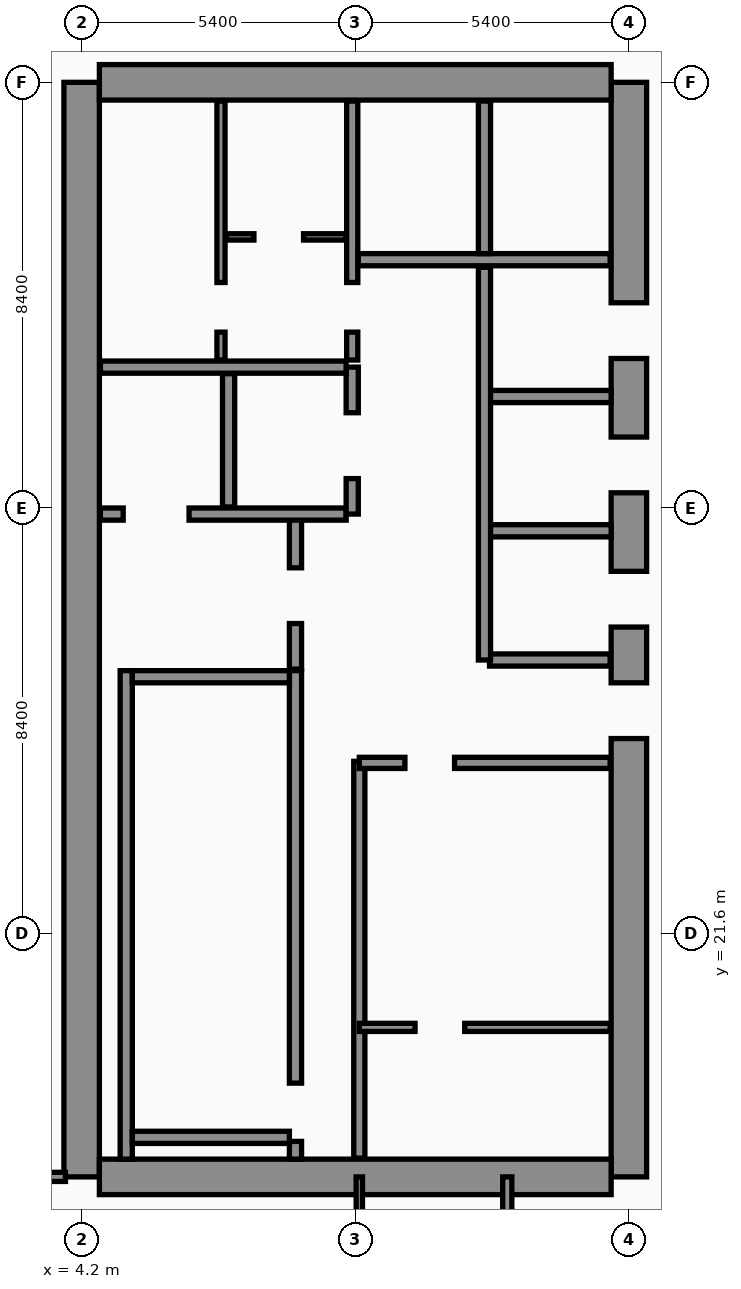
"""IFC4 building model, lengths in metres.
Left out: names, types, materials, properties, quantities, classifications, styles, units other than length and angle.
Written with IfcOpenShell. Run it as: python <this file> out.ifc"""

import sys

from ifc_helpers import new_model, si_unit, direction, frame, frame_2d, origin, place, context, subcontext, project, spatial, rectangle, extrude, element, fill, save


model = new_model("IFC4")
c1 = context("Model", 3, precision=1e-05, world=origin(), true_north=direction((0.0, 1.0)))
c2 = subcontext(c1, "Body", "Model", "MODEL_VIEW")
j1 = project(units=[si_unit("LENGTHUNIT", "METRE"), si_unit("PLANEANGLEUNIT", "RADIAN")], contexts=[c1])
p1 = place(None, origin())
s1 = spatial("IfcSite", under=j1, at=p1, CompositionType="ELEMENT")
p2 = place(p1, origin())
s2 = spatial("IfcBuilding", under=s1, at=p2, CompositionType="ELEMENT")
p3 = place(p2, frame((0.0, 0.0, 211.0)))
s3 = spatial("IfcBuildingStorey", under=s2, at=p3, CompositionType="ELEMENT", Elevation=211.0)
p4 = place(p3, frame((4.2, 16.8, 0.0), z_axis=(0.0, 0.0, 1.0), x_axis=(0.0, 1.0, 0.0)))
e1 = element("IfcWall", 1, at=p4, inside=s3, PredefinedType="SHEAR", context=c2, shape_type="SweptSolid", body=[
    extrude(rectangle(XDim=21.6, YDim=0.7, at=frame_2d((10.8, 0.0))), origin(), (0.0, 0.0, 1.0), 3.56),
])
p5 = place(p3, frame((15.0, 16.8, 0.0), z_axis=(0.0, 0.0, 1.0), x_axis=(0.0, 1.0, 0.0)))
e2 = element("IfcWall", 2, at=p5, inside=s3, PredefinedType="SHEAR", context=c2, shape_type="SweptSolid", body=[
    extrude(rectangle(XDim=21.6, YDim=0.7, at=frame_2d((10.8, 0.0))), origin(), (0.0, 0.0, 1.0), 3.56),
])
p6 = place(p5, frame((8.65, 0.0, 0.0)))
e3 = element("IfcOpeningElement", 3, at=p6, cuts=e2, PredefinedType="OPENING", context=c2, shape_type="SweptSolid", body=[
    extrude(rectangle(XDim=1.1, YDim=2.2, at=frame_2d((0.55, 1.1))), frame((0.0, 0.36, 0.0), z_axis=(0.0, -1.0, 0.0), x_axis=(1.0, 0.0, 0.0)), (0.0, 0.0, 1.0), 0.72),
])
p7 = place(p5, frame((10.85, 0.0, 0.0)))
e4 = element("IfcOpeningElement", 4, at=p7, cuts=e2, PredefinedType="OPENING", context=c2, shape_type="SweptSolid", body=[
    extrude(rectangle(XDim=1.1, YDim=2.2, at=frame_2d((0.55, 1.1))), frame((0.0, 0.36, 0.0), z_axis=(0.0, -1.0, 0.0), x_axis=(1.0, 0.0, 0.0)), (0.0, 0.0, 1.0), 0.72),
])
p8 = place(p5, frame((13.5, 0.0, 0.0)))
e5 = element("IfcOpeningElement", 5, at=p8, cuts=e2, PredefinedType="OPENING", context=c2, shape_type="SweptSolid", body=[
    extrude(rectangle(XDim=1.1, YDim=2.2, at=frame_2d((0.55, 1.1))), frame((0.0, 0.36, 0.0), z_axis=(0.0, -1.0, 0.0), x_axis=(1.0, 0.0, 0.0)), (0.0, 0.0, 1.0), 0.72),
])
p9 = place(p5, frame((16.15, 0.0, 0.0)))
e6 = element("IfcOpeningElement", 6, at=p9, cuts=e2, PredefinedType="OPENING", context=c2, shape_type="SweptSolid", body=[
    extrude(rectangle(XDim=1.1, YDim=2.2, at=frame_2d((0.55, 1.1))), frame((0.0, 0.36, 0.0), z_axis=(0.0, -1.0, 0.0), x_axis=(1.0, 0.0, 0.0)), (0.0, 0.0, 1.0), 0.72),
])
for number, where, z_axis, x_axis in (
    (7, (4.55, 38.4, 0.0), (0.0, 0.0, 1.0), (1.0, 0.0, 0.0)),
    (8, (4.55, 16.8, 0.0), (0.0, 0.0, 1.0), (1.0, 0.0, 0.0)),
):
    element("IfcWall", number, at=place(p3, frame(where, z_axis=z_axis, x_axis=x_axis)), inside=s3, PredefinedType="SHEAR", context=c2, shape_type="SweptSolid", body=[
        extrude(rectangle(XDim=10.1, YDim=0.7, at=frame_2d((5.05, 0.0))), origin(), (0.0, 0.0, 1.0), 3.56),
    ])
p10 = place(p3, frame((5.08, 17.15, 0.0), z_axis=(0.0, 0.0, 1.0), x_axis=(0.0, 1.0, 0.0)))
e9 = element("IfcWall", 9, at=p10, inside=s3, PredefinedType="SOLIDWALL", context=c2, shape_type="SweptSolid", body=[
    extrude(rectangle(XDim=9.64, YDim=0.24, at=frame_2d((4.82, 0.0))), origin(), (0.0, 0.0, 1.0), 3.56),
])
p11 = place(p3, frame((8.42, 17.15, 0.0), z_axis=(0.0, 0.0, 1.0), x_axis=(0.0, 1.0, 0.0)))
e10 = element("IfcWall", 10, at=p11, inside=s3, PredefinedType="SOLIDWALL", context=c2, shape_type="SweptSolid", body=[
    extrude(rectangle(XDim=9.64, YDim=0.24, at=frame_2d((4.82, 0.0))), origin(), (0.0, 0.0, 1.0), 3.56),
])
p12 = place(p11, frame((0.35, 0.0, 0.0)))
e11 = element("IfcOpeningElement", 11, at=p12, cuts=e10, PredefinedType="OPENING", context=c2, shape_type="SweptSolid", body=[
    extrude(rectangle(XDim=1.15, YDim=2.2, at=frame_2d((0.575, 1.1))), frame((0.0, 0.13, 0.0), z_axis=(0.0, -1.0, 0.0), x_axis=(1.0, 0.0, 0.0)), (0.0, 0.0, 1.0), 0.26),
])
for number, where, z_axis, x_axis in (
    (12, (5.2, 17.58, 0.0), (0.0, 0.0, 1.0), (1.0, 0.0, 0.0)),
    (13, (5.2, 26.67, 0.0), (0.0, 0.0, 1.0), (1.0, 0.0, 0.0)),
):
    element("IfcWall", number, at=place(p3, frame(where, z_axis=z_axis, x_axis=x_axis)), inside=s3, PredefinedType="SOLIDWALL", context=c2, shape_type="SweptSolid", body=[
        extrude(rectangle(XDim=3.1, YDim=0.24, at=frame_2d((1.55, 0.0))), origin(), (0.0, 0.0, 1.0), 3.56),
    ])
for number, where, z_axis, x_axis in (
    (14, (12.18, 29.55, 0.0), (0.0, 0.0, 1.0), (1.0, 0.0, 0.0)),
    (15, (12.18, 32.2, 0.0), (0.0, 0.0, 1.0), (1.0, 0.0, 0.0)),
):
    element("IfcWall", number, at=place(p3, frame(where, z_axis=z_axis, x_axis=x_axis)), inside=s3, PredefinedType="SOLIDWALL", context=c2, shape_type="SweptSolid", body=[
        extrude(rectangle(XDim=2.47, YDim=0.24, at=frame_2d((1.235, 0.0))), origin(), (0.0, 0.0, 1.0), 3.56),
    ])
p13 = place(p3, frame((8.42, 26.82, 0.0), z_axis=(0.0, 0.0, 1.0), x_axis=(0.0, 1.0, 0.0)))
e16 = element("IfcWall", 16, at=p13, inside=s3, PredefinedType="SOLIDWALL", context=c2, shape_type="SweptSolid", body=[
    extrude(rectangle(XDim=3.0, YDim=0.24, at=frame_2d((1.5, 0.0))), origin(), (0.0, 0.0, 1.0), 3.56),
])
p14 = place(p13, frame((0.9, 0.0, 0.0)))
e17 = element("IfcOpeningElement", 17, at=p14, cuts=e16, PredefinedType="OPENING", context=c2, shape_type="SweptSolid", body=[
    extrude(rectangle(XDim=1.1, YDim=2.2, at=frame_2d((0.55, 1.1))), frame((0.0, 0.13, 0.0), z_axis=(0.0, -1.0, 0.0), x_axis=(1.0, 0.0, 0.0)), (0.0, 0.0, 1.0), 0.26),
])
p15 = place(p3, frame((4.57, 29.88, 0.0), z_axis=(0.0, 0.0, 1.0), x_axis=(1.0, 0.0, 0.0)))
e18 = element("IfcWall", 18, at=p15, inside=s3, PredefinedType="SOLIDWALL", context=c2, shape_type="SweptSolid", body=[
    extrude(rectangle(XDim=4.85, YDim=0.24, at=frame_2d((2.425, 0.0))), origin(), (0.0, 0.0, 1.0), 3.56),
])
p16 = place(p15, frame((0.45, 0.0, 0.0)))
e19 = element("IfcOpeningElement", 19, at=p16, cuts=e18, PredefinedType="OPENING", context=c2, shape_type="SweptSolid", body=[
    extrude(rectangle(XDim=1.3, YDim=2.35, at=frame_2d((0.65, 1.175))), frame((0.0, 0.13, 0.0), z_axis=(0.0, -1.0, 0.0), x_axis=(1.0, 0.0, 0.0)), (0.0, 0.0, 1.0), 0.26),
])
p17 = place(p3, frame((7.1, 30.02, 0.0), z_axis=(0.0, 0.0, 1.0), x_axis=(0.0, 1.0, 0.0)))
e20 = element("IfcWall", 20, at=p17, inside=s3, PredefinedType="SOLIDWALL", context=c2, shape_type="SweptSolid", body=[
    extrude(rectangle(XDim=2.63, YDim=0.24, at=frame_2d((1.315, 0.0))), origin(), (0.0, 0.0, 1.0), 3.56),
])
p18 = place(p3, frame((9.54, 29.88, 0.0), z_axis=(0.0, 0.0, 1.0), x_axis=(0.0, 1.0, 0.0)))
e21 = element("IfcWall", 21, at=p18, inside=s3, PredefinedType="SOLIDWALL", context=c2, shape_type="SweptSolid", body=[
    extrude(rectangle(XDim=2.9, YDim=0.24, at=frame_2d((1.45, 0.0))), origin(), (0.0, 0.0, 1.0), 3.56),
])
p19 = place(p18, frame((0.7, 0.0, 0.0)))
e22 = element("IfcOpeningElement", 22, at=p19, cuts=e21, PredefinedType="OPENING", context=c2, shape_type="SweptSolid", body=[
    extrude(rectangle(XDim=1.3, YDim=2.35, at=frame_2d((0.65, 1.175))), frame((0.0, 0.13, 0.0), z_axis=(0.0, -1.0, 0.0), x_axis=(1.0, 0.0, 0.0)), (0.0, 0.0, 1.0), 0.26),
])
p20 = place(p3, frame((4.57, 32.78, 0.0), z_axis=(0.0, 0.0, 1.0), x_axis=(1.0, 0.0, 0.0)))
e23 = element("IfcWall", 23, at=p20, inside=s3, PredefinedType="SOLIDWALL", context=c2, shape_type="SweptSolid", body=[
    extrude(rectangle(XDim=4.85, YDim=0.24, at=frame_2d((2.425, 0.0))), origin(), (0.0, 0.0, 1.0), 3.19),
])
p21 = place(p3, frame((9.68, 17.17, 0.0), z_axis=(0.0, 0.0, 1.0), x_axis=(0.0, 1.0, 0.0)))
e24 = element("IfcWall", 24, at=p21, inside=s3, PredefinedType="SOLIDWALL", context=c2, shape_type="SweptSolid", body=[
    extrude(rectangle(XDim=7.83, YDim=0.22, at=frame_2d((3.915, 0.0))), origin(), (0.0, 0.0, 1.0), 3.56),
])
p22 = place(p3, frame((6.95, 32.92, 0.0), z_axis=(0.0, 0.0, 1.0), x_axis=(0.0, 1.0, 0.0)))
e25 = element("IfcWall", 25, at=p22, inside=s3, PredefinedType="PARTITIONING", context=c2, shape_type="SweptSolid", body=[
    extrude(rectangle(XDim=5.11, YDim=0.16, at=frame_2d((2.555, 0.0))), origin(), (0.0, 0.0, 1.0), 3.56),
])
p23 = place(p22, frame((0.55, 0.0, 0.0)))
e26 = element("IfcOpeningElement", 26, at=p23, cuts=e25, PredefinedType="OPENING", context=c2, shape_type="SweptSolid", body=[
    extrude(rectangle(XDim=0.98, YDim=2.15, at=frame_2d((0.49, 1.075))), frame((0.0, 0.09, 0.0), z_axis=(0.0, -1.0, 0.0), x_axis=(1.0, 0.0, 0.0)), (0.0, 0.0, 1.0), 0.18),
])
p24 = place(p3, frame((7.05, 35.35, 0.0), z_axis=(0.0, 0.0, 1.0), x_axis=(1.0, 0.0, 0.0)))
e27 = element("IfcWall", 27, at=p24, inside=s3, PredefinedType="PARTITIONING", context=c2, shape_type="SweptSolid", body=[
    extrude(rectangle(XDim=2.37, YDim=0.125, at=frame_2d((1.185, 0.0))), origin(), (0.0, 0.0, 1.0), 3.56),
])
p25 = place(p24, frame((0.55, 0.0, 0.0)))
e28 = element("IfcOpeningElement", 28, at=p25, cuts=e27, PredefinedType="OPENING", context=c2, shape_type="SweptSolid", body=[
    extrude(rectangle(XDim=0.98, YDim=2.15, at=frame_2d((0.49, 1.075))), frame((0.0, 0.073, 0.0), z_axis=(0.0, -1.0, 0.0), x_axis=(1.0, 0.0, 0.0)), (0.0, 0.0, 1.0), 0.145),
])
p26 = place(p3, frame((9.54, 32.92, 0.0), z_axis=(0.0, 0.0, 1.0), x_axis=(0.0, 1.0, 0.0)))
e29 = element("IfcWall", 29, at=p26, inside=s3, PredefinedType="SOLIDWALL", context=c2, shape_type="SweptSolid", body=[
    extrude(rectangle(XDim=5.11, YDim=0.22, at=frame_2d((2.555, 0.0))), origin(), (0.0, 0.0, 1.0), 3.56),
])
p27 = place(p26, frame((0.55, 0.0, 0.0)))
e30 = element("IfcOpeningElement", 30, at=p27, cuts=e29, PredefinedType="OPENING", context=c2, shape_type="SweptSolid", body=[
    extrude(rectangle(XDim=0.98, YDim=2.15, at=frame_2d((0.49, 1.075))), frame((0.0, 0.12, 0.0), z_axis=(0.0, -1.0, 0.0), x_axis=(1.0, 0.0, 0.0)), (0.0, 0.0, 1.0), 0.24),
])
p28 = place(p3, frame((9.68, 19.75, 0.0), z_axis=(0.0, 0.0, 1.0), x_axis=(1.0, 0.0, 0.0)))
e31 = element("IfcWall", 31, at=p28, inside=s3, PredefinedType="PARTITIONING", context=c2, shape_type="SweptSolid", body=[
    extrude(rectangle(XDim=4.95, YDim=0.16, at=frame_2d((2.475, 0.0))), origin(), (0.0, 0.0, 1.0), 3.56),
])
p29 = place(p28, frame((1.1, 0.0, 0.0)))
e32 = element("IfcOpeningElement", 32, at=p29, cuts=e31, PredefinedType="OPENING", context=c2, shape_type="SweptSolid", body=[
    extrude(rectangle(XDim=0.98, YDim=2.15, at=frame_2d((0.49, 1.075))), frame((0.0, 0.09, 0.0), z_axis=(0.0, -1.0, 0.0), x_axis=(1.0, 0.0, 0.0)), (0.0, 0.0, 1.0), 0.18),
])
p30 = place(p3, frame((9.68, 24.97, 0.0), z_axis=(0.0, 0.0, 1.0), x_axis=(1.0, 0.0, 0.0)))
e33 = element("IfcWall", 33, at=p30, inside=s3, PredefinedType="SOLIDWALL", context=c2, shape_type="SweptSolid", body=[
    extrude(rectangle(XDim=4.95, YDim=0.22, at=frame_2d((2.475, 0.0))), origin(), (0.0, 0.0, 1.0), 2.94),
])
p31 = place(p30, frame((0.9, 0.0, 0.0)))
e34 = element("IfcOpeningElement", 34, at=p31, cuts=e33, PredefinedType="OPENING", context=c2, shape_type="SweptSolid", body=[
    extrude(rectangle(XDim=0.98, YDim=2.15, at=frame_2d((0.49, 1.075))), frame((0.0, 0.12, 0.0), z_axis=(0.0, -1.0, 0.0), x_axis=(1.0, 0.0, 0.0)), (0.0, 0.0, 1.0), 0.24),
])
p32 = place(p3, frame((12.25, 27.0, 0.0), z_axis=(0.0, 0.0, 1.0), x_axis=(1.0, 0.0, 0.0)))
e35 = element("IfcWall", 35, at=p32, inside=s3, PredefinedType="SOLIDWALL", context=c2, shape_type="SweptSolid", body=[
    extrude(rectangle(XDim=2.38, YDim=0.24, at=frame_2d((1.19, 0.0))), origin(), (0.0, 0.0, 1.0), 3.56),
])
p33 = place(p3, frame((12.15, 27.0, 0.0), z_axis=(0.0, 0.0, 1.0), x_axis=(0.0, 1.0, 0.0)))
e36 = element("IfcWall", 36, at=p33, inside=s3, PredefinedType="SOLIDWALL", context=c2, shape_type="SweptSolid", body=[
    extrude(rectangle(XDim=7.75, YDim=0.24, at=frame_2d((3.875, 0.0))), origin(), (0.0, 0.0, 1.0), 3.56),
])
p34 = place(p3, frame((9.66, 34.9, 0.0), z_axis=(0.0, 0.0, 1.0), x_axis=(1.0, 0.0, 0.0)))
e37 = element("IfcWall", 37, at=p34, inside=s3, PredefinedType="SOLIDWALL", context=c2, shape_type="SweptSolid", body=[
    extrude(rectangle(XDim=4.97, YDim=0.24, at=frame_2d((2.485, 0.0))), origin(), (0.0, 0.0, 1.0), 3.56),
])
p35 = place(p3, frame((12.15, 35.02, 0.0), z_axis=(0.0, 0.0, 1.0), x_axis=(0.0, 1.0, 0.0)))
e38 = element("IfcWall", 38, at=p35, inside=s3, PredefinedType="SOLIDWALL", context=c2, shape_type="SweptSolid", body=[
    extrude(rectangle(XDim=3.01, YDim=0.24, at=frame_2d((1.505, 0.0))), origin(), (0.0, 0.0, 1.0), 3.56),
])
p36 = place(p3, frame((0.08, 16.8, 0.0), z_axis=(0.0, 0.0, 1.0), x_axis=(1.0, 0.0, 0.0)))
e39 = element("IfcWall", 39, at=p36, inside=s3, PredefinedType="PARTITIONING", context=c2, shape_type="SweptSolid", body=[
    extrude(rectangle(XDim=3.8, YDim=0.18, at=frame_2d((1.9, 0.0))), origin(), (0.0, 0.0, 1.0), 2.94),
])
p37 = place(p3, frame((9.68, 14.75, 0.0), z_axis=(0.0, 0.0, 1.0), x_axis=(0.0, 1.0, 0.0)))
e40 = element("IfcWall", 40, at=p37, inside=s3, PredefinedType="PARTITIONING", context=c2, shape_type="SweptSolid", body=[
    extrude(rectangle(XDim=2.05, YDim=0.125, at=frame_2d((1.025, 0.0))), origin(), (0.0, 0.0, 1.0), 3.56),
])
p38 = place(p3, frame((12.6, 2.44, 0.0), z_axis=(0.0, 0.0, 1.0), x_axis=(0.0, 1.0, 0.0)))
e41 = element("IfcWall", 41, at=p38, inside=s3, PredefinedType="PARTITIONING", context=c2, shape_type="SweptSolid", body=[
    extrude(rectangle(XDim=14.36, YDim=0.18, at=frame_2d((7.18, 0.0))), origin(), (0.0, 0.0, 1.0), 2.94),
])
p39 = place(p38, frame((3.01, 0.0, 0.0)))
e42 = element("IfcOpeningElement", 42, at=p39, cuts=e41, PredefinedType="OPENING", context=c2, shape_type="SweptSolid", body=[
    extrude(rectangle(XDim=1.02, YDim=2.2, at=frame_2d((0.51, 1.1))), frame((0.0, 0.1, 0.0), z_axis=(0.0, -1.0, 0.0), x_axis=(1.0, 0.0, 0.0)), (0.0, 0.0, 1.0), 0.2),
])
p40 = place(p38, frame((9.95, 0.0, 0.0)))
e43 = element("IfcOpeningElement", 43, at=p40, cuts=e41, PredefinedType="OPENING", context=c2, shape_type="SweptSolid", body=[
    extrude(rectangle(XDim=1.02, YDim=2.2, at=frame_2d((0.51, 1.1))), frame((0.0, 0.1, 0.0), z_axis=(0.0, -1.0, 0.0), x_axis=(1.0, 0.0, 0.0)), (0.0, 0.0, 1.0), 0.2),
])
p41 = place(p14, origin())
e44 = element("IfcDoor", 44, at=p41, inside=s3, OperationType="SINGLE_SWING_RIGHT", PredefinedType="DOOR", context=c2, shape_type="SweptSolid", body=[
    extrude(rectangle(XDim=1.1, YDim=2.2, at=frame_2d((0.55, 1.1))), frame((0.0, 0.025, 0.0), z_axis=(0.0, -1.0, 0.0), x_axis=(1.0, 0.0, 0.0)), (0.0, 0.0, 1.0), 0.05),
])
fill(e17, e44)
p42 = place(p16, origin())
e45 = element("IfcDoor", 45, at=p42, inside=s3, OperationType="DOUBLE_DOOR_SLIDING", PredefinedType="DOOR", context=c2, shape_type="SweptSolid", body=[
    extrude(rectangle(XDim=1.3, YDim=2.35, at=frame_2d((0.65, 1.175))), frame((0.0, 0.025, 0.0), z_axis=(0.0, -1.0, 0.0), x_axis=(1.0, 0.0, 0.0)), (0.0, 0.0, 1.0), 0.05),
])
fill(e19, e45)
p43 = place(p19, origin())
e46 = element("IfcDoor", 46, at=p43, inside=s3, OperationType="DOUBLE_DOOR_SLIDING", PredefinedType="DOOR", context=c2, shape_type="SweptSolid", body=[
    extrude(rectangle(XDim=1.3, YDim=2.35, at=frame_2d((0.65, 1.175))), frame((0.0, 0.025, 0.0), z_axis=(0.0, -1.0, 0.0), x_axis=(1.0, 0.0, 0.0)), (0.0, 0.0, 1.0), 0.05),
])
fill(e22, e46)
p44 = place(p23, origin())
e47 = element("IfcDoor", 47, at=p44, inside=s3, OperationType="SINGLE_SWING_LEFT", PredefinedType="DOOR", context=c2, shape_type="SweptSolid", body=[
    extrude(rectangle(XDim=0.98, YDim=2.15, at=frame_2d((0.49, 1.075))), frame((0.0, 0.025, 0.0), z_axis=(0.0, -1.0, 0.0), x_axis=(1.0, 0.0, 0.0)), (0.0, 0.0, 1.0), 0.05),
])
fill(e26, e47)
p45 = place(p25, origin())
e48 = element("IfcDoor", 48, at=p45, inside=s3, OperationType="SINGLE_SWING_RIGHT", PredefinedType="DOOR", context=c2, shape_type="SweptSolid", body=[
    extrude(rectangle(XDim=0.98, YDim=2.15, at=frame_2d((0.49, 1.075))), frame((0.0, 0.025, 0.0), z_axis=(0.0, -1.0, 0.0), x_axis=(1.0, 0.0, 0.0)), (0.0, 0.0, 1.0), 0.05),
])
fill(e28, e48)
p46 = place(p27, origin())
e49 = element("IfcDoor", 49, at=p46, inside=s3, OperationType="SINGLE_SWING_LEFT", PredefinedType="DOOR", context=c2, shape_type="SweptSolid", body=[
    extrude(rectangle(XDim=0.98, YDim=2.15, at=frame_2d((0.49, 1.075))), frame((0.0, 0.025, 0.0), z_axis=(0.0, -1.0, 0.0), x_axis=(1.0, 0.0, 0.0)), (0.0, 0.0, 1.0), 0.05),
])
fill(e30, e49)
p47 = place(p29, origin())
e50 = element("IfcDoor", 50, at=p47, inside=s3, OperationType="SINGLE_SWING_LEFT", PredefinedType="DOOR", context=c2, shape_type="SweptSolid", body=[
    extrude(rectangle(XDim=0.98, YDim=2.15, at=frame_2d((0.49, 1.075))), frame((0.0, 0.025, 0.0), z_axis=(0.0, -1.0, 0.0), x_axis=(1.0, 0.0, 0.0)), (0.0, 0.0, 1.0), 0.05),
])
fill(e32, e50)
p48 = place(p31, origin())
e51 = element("IfcDoor", 51, at=p48, inside=s3, OperationType="SINGLE_SWING_RIGHT", PredefinedType="DOOR", context=c2, shape_type="SweptSolid", body=[
    extrude(rectangle(XDim=0.98, YDim=2.15, at=frame_2d((0.49, 1.075))), frame((0.0, 0.025, 0.0), z_axis=(0.0, -1.0, 0.0), x_axis=(1.0, 0.0, 0.0)), (0.0, 0.0, 1.0), 0.05),
])
fill(e34, e51)
p49 = place(p12, origin())
e52 = element("IfcDoor", 52, at=p49, inside=s3, OperationType="SINGLE_SWING_LEFT", PredefinedType="DOOR", context=c2, shape_type="SweptSolid", body=[
    extrude(rectangle(XDim=1.15, YDim=2.2, at=frame_2d((0.575, 1.1))), frame((0.0, 0.025, 0.0), z_axis=(0.0, -1.0, 0.0), x_axis=(1.0, 0.0, 0.0)), (0.0, 0.0, 1.0), 0.05),
])
fill(e11, e52)
p50 = place(p6, origin())
e53 = element("IfcDoor", 53, at=p50, inside=s3, OperationType="SINGLE_SWING_LEFT", PredefinedType="DOOR", context=c2, shape_type="SweptSolid", body=[
    extrude(rectangle(XDim=1.1, YDim=2.2, at=frame_2d((0.55, 1.1))), frame((0.0, 0.025, 0.0), z_axis=(0.0, -1.0, 0.0), x_axis=(1.0, 0.0, 0.0)), (0.0, 0.0, 1.0), 0.05),
])
fill(e3, e53)
p51 = place(p7, origin())
e54 = element("IfcDoor", 54, at=p51, inside=s3, OperationType="DOUBLE_DOOR_SLIDING", PredefinedType="DOOR", context=c2, shape_type="SweptSolid", body=[
    extrude(rectangle(XDim=1.1, YDim=2.2, at=frame_2d((0.55, 1.1))), frame((0.0, 0.025, 0.0), z_axis=(0.0, -1.0, 0.0), x_axis=(1.0, 0.0, 0.0)), (0.0, 0.0, 1.0), 0.05),
])
fill(e4, e54)
p52 = place(p8, origin())
e55 = element("IfcDoor", 55, at=p52, inside=s3, OperationType="DOUBLE_DOOR_SLIDING", PredefinedType="DOOR", context=c2, shape_type="SweptSolid", body=[
    extrude(rectangle(XDim=1.1, YDim=2.2, at=frame_2d((0.55, 1.1))), frame((0.0, 0.025, 0.0), z_axis=(0.0, -1.0, 0.0), x_axis=(1.0, 0.0, 0.0)), (0.0, 0.0, 1.0), 0.05),
])
fill(e5, e55)
p53 = place(p9, origin())
e56 = element("IfcDoor", 56, at=p53, inside=s3, OperationType="DOUBLE_DOOR_SLIDING", PredefinedType="DOOR", context=c2, shape_type="SweptSolid", body=[
    extrude(rectangle(XDim=1.1, YDim=2.2, at=frame_2d((0.55, 1.1))), frame((0.0, 0.025, 0.0), z_axis=(0.0, -1.0, 0.0), x_axis=(1.0, 0.0, 0.0)), (0.0, 0.0, 1.0), 0.05),
])
fill(e6, e56)
save(model, sys.argv[1])
